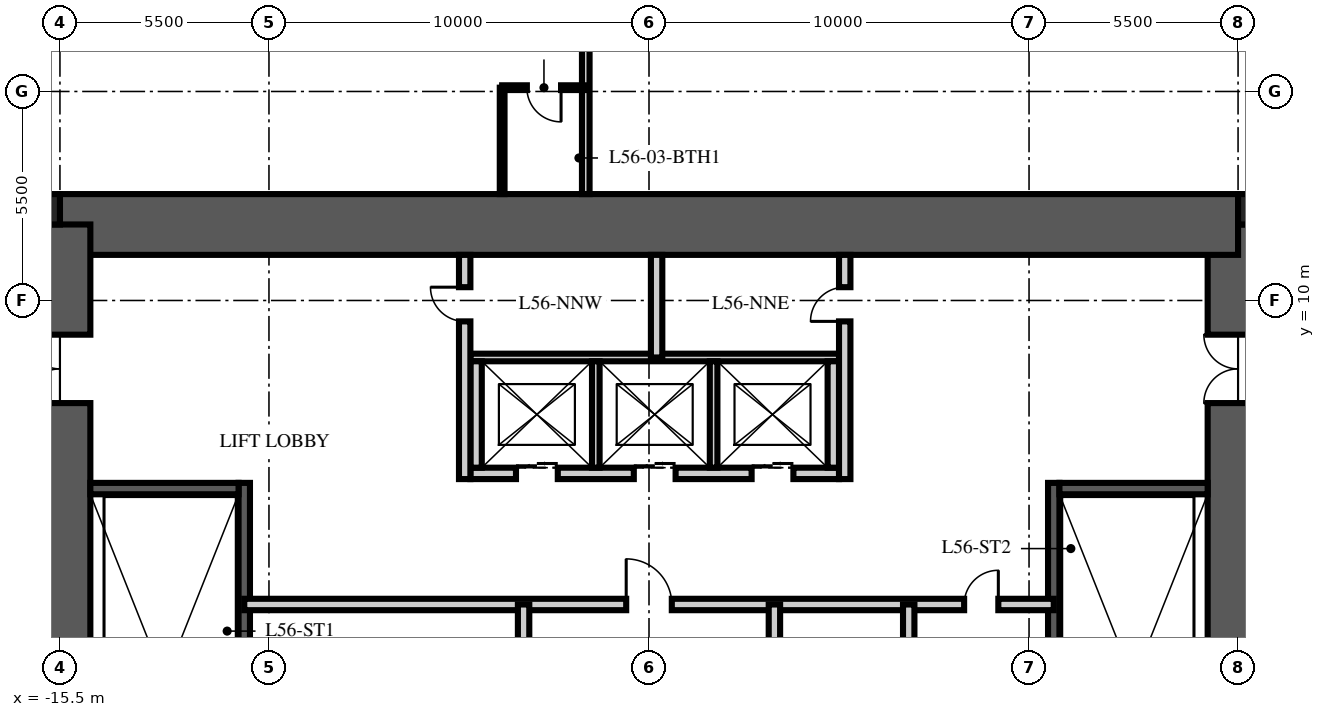
"""IFC4 building model, lengths in metres.
Left out: names, types, materials, properties, quantities, classifications, styles, units other than length and angle.
Written with IfcOpenShell. Run it as: python <this file> out.ifc"""

import sys

from ifc_helpers import new_model, si_unit, direction, frame, frame_2d, origin, origin_2d, place, context, subcontext, project, spatial, rectangle, extrude, element, fill, save


model = new_model("IFC4")
c1 = context("Model", 3, precision=1e-05, world=origin(), true_north=direction((0.0, 1.0)))
c2 = subcontext(c1, "Body", "Model", "MODEL_VIEW")
j1 = project(units=[si_unit("LENGTHUNIT", "METRE"), si_unit("PLANEANGLEUNIT", "RADIAN")], contexts=[c1])
p1 = place(None, origin())
s1 = spatial("IfcSite", under=j1, at=p1, CompositionType="ELEMENT")
p2 = place(p1, origin())
s2 = spatial("IfcBuilding", under=s1, at=p2, CompositionType="ELEMENT")
p3 = place(p2, frame((0.0, 0.0, 225.75)))
s3 = spatial("IfcBuildingStorey", under=s2, at=p3, CompositionType="ELEMENT", Elevation=225.75)
p4 = place(p3, frame((15.5, -12.0, -0.25), z_axis=(0.0, 0.0, 1.0), x_axis=(0.0, 1.0, 0.0)))
e1 = element("IfcWall", 1, at=p4, inside=s3, PredefinedType="SHEAR", context=c2, shape_type="SweptSolid", body=[
    extrude(rectangle(XDim=24.0, YDim=1.6, at=frame_2d((12.0, 0.0))), origin(), (0.0, 0.0, 1.0), 3.75),
])
p5 = place(p4, frame((3.2, 0.0, 0.25)))
e2 = element("IfcOpeningElement", 2, at=p5, cuts=e1, PredefinedType="OPENING", context=c2, shape_type="SweptSolid", body=[
    extrude(rectangle(XDim=1.2, YDim=2.1, at=frame_2d((0.6, 1.05))), frame((0.0, 0.81, 0.0), z_axis=(0.0, -1.0, 0.0), x_axis=(1.0, 0.0, 0.0)), (0.0, 0.0, 1.0), 1.62),
])
p6 = place(p4, frame((19.3, 0.0, 0.25)))
e3 = element("IfcOpeningElement", 3, at=p6, cuts=e1, PredefinedType="OPENING", context=c2, shape_type="SweptSolid", body=[
    extrude(rectangle(XDim=1.8, YDim=2.1, at=frame_2d((0.9, 1.05))), frame((0.0, 0.81, 0.0), z_axis=(0.0, -1.0, 0.0), x_axis=(1.0, 0.0, 0.0)), (0.0, 0.0, 1.0), 1.62),
])
p7 = place(p3, frame((-15.5, 12.0, -0.25), z_axis=(0.0, 0.0, 1.0), x_axis=(1.0, 0.0, 0.0)))
e4 = element("IfcWall", 4, at=p7, inside=s3, PredefinedType="SHEAR", context=c2, shape_type="SweptSolid", body=[
    extrude(rectangle(XDim=31.0, YDim=1.6, at=frame_2d((15.5, 0.0))), origin(), (0.0, 0.0, 1.0), 3.75),
])
p8 = place(p3, frame((-15.5, -12.0, -0.25), z_axis=(0.0, 0.0, 1.0), x_axis=(0.0, 1.0, 0.0)))
e5 = element("IfcWall", 5, at=p8, inside=s3, PredefinedType="SHEAR", context=c2, shape_type="SweptSolid", body=[
    extrude(rectangle(XDim=24.0, YDim=1.6, at=frame_2d((12.0, 0.0))), origin(), (0.0, 0.0, 1.0), 3.75),
])
p9 = place(p8, frame((3.2, 0.0, 0.25)))
e6 = element("IfcOpeningElement", 6, at=p9, cuts=e5, PredefinedType="OPENING", context=c2, shape_type="SweptSolid", body=[
    extrude(rectangle(XDim=1.2, YDim=2.1, at=frame_2d((0.6, 1.05))), frame((0.0, 0.81, 0.0), z_axis=(0.0, -1.0, 0.0), x_axis=(1.0, 0.0, 0.0)), (0.0, 0.0, 1.0), 1.62),
])
p10 = place(p8, frame((19.3, 0.0, 0.25)))
e7 = element("IfcOpeningElement", 7, at=p10, cuts=e5, PredefinedType="OPENING", context=c2, shape_type="SweptSolid", body=[
    extrude(rectangle(XDim=1.8, YDim=2.1, at=frame_2d((0.9, 1.05))), frame((0.0, 0.81, 0.0), z_axis=(0.0, -1.0, 0.0), x_axis=(1.0, 0.0, 0.0)), (0.0, 0.0, 1.0), 1.62),
])
for number, where, z_axis, x_axis in (
    (8, (15.9, 12.4, -0.25), (0.0, 0.0, 1.0), (1.0, 0.0, 0.0)),
    (9, (-15.9, 12.4, -0.25), (0.0, 0.0, 1.0), (1.0, 0.0, 0.0)),
):
    element("IfcColumn", number, at=place(p3, frame(where, z_axis=z_axis, x_axis=x_axis)), inside=s3, PredefinedType="COLUMN", context=c2, shape_type="SweptSolid", body=[
        extrude(rectangle(XDim=0.8, YDim=0.8, at=origin_2d()), origin(), (0.0, 0.0, 1.0), 3.75),
    ])
p11 = place(p3, frame((-10.65, -4.9, 0.0), z_axis=(0.0, 0.0, 1.0), x_axis=(0.0, 1.0, 0.0)))
e10 = element("IfcWall", 10, at=p11, inside=s3, PredefinedType="SOLIDWALL", context=c2, shape_type="SweptSolid", body=[
    extrude(rectangle(XDim=10.1, YDim=0.3, at=frame_2d((5.05, 0.0))), origin(), (0.0, 0.0, 1.0), 3.5),
])
p12 = place(p3, frame((-14.7, 5.05, 0.0), z_axis=(0.0, 0.0, 1.0), x_axis=(1.0, 0.0, 0.0)))
e11 = element("IfcWall", 11, at=p12, inside=s3, PredefinedType="SOLIDWALL", context=c2, shape_type="SweptSolid", body=[
    extrude(rectangle(XDim=3.9, YDim=0.3, at=frame_2d((1.95, 0.0))), origin(), (0.0, 0.0, 1.0), 3.5),
])
p13 = place(p3, frame((10.65, -4.9, 0.0), z_axis=(0.0, 0.0, 1.0), x_axis=(0.0, 1.0, 0.0)))
e12 = element("IfcWall", 12, at=p13, inside=s3, PredefinedType="SOLIDWALL", context=c2, shape_type="SweptSolid", body=[
    extrude(rectangle(XDim=10.1, YDim=0.3, at=frame_2d((5.05, 0.0))), origin(), (0.0, 0.0, 1.0), 3.5),
])
p14 = place(p3, frame((14.7, 5.05, 0.0), z_axis=(0.0, 0.0, 1.0), x_axis=(-1.0, 0.0, 0.0)))
e13 = element("IfcWall", 13, at=p14, inside=s3, PredefinedType="SOLIDWALL", context=c2, shape_type="SweptSolid", body=[
    extrude(rectangle(XDim=3.9, YDim=0.3, at=frame_2d((1.95, 0.0))), origin(), (0.0, 0.0, 1.0), 3.5),
])
p15 = place(p3, frame((-4.7, 5.45, 0.0), z_axis=(0.0, 0.0, 1.0), x_axis=(1.0, 0.0, 0.0)))
e14 = element("IfcWall", 14, at=p15, inside=s3, PredefinedType="PARTITIONING", context=c2, shape_type="SweptSolid", body=[
    extrude(rectangle(XDim=9.7, YDim=0.3, at=frame_2d((4.85, 0.0))), origin(), (0.0, 0.0, 1.0), 3.5),
])
p16 = place(p15, frame((1.2, 0.0, 0.0)))
e15 = element("IfcOpeningElement", 15, at=p16, cuts=e14, PredefinedType="OPENING", context=c2, shape_type="SweptSolid", body=[
    extrude(rectangle(XDim=1.1, YDim=2.1, at=frame_2d((0.55, 1.05))), frame((0.0, 0.16, 0.0), z_axis=(0.0, -1.0, 0.0), x_axis=(1.0, 0.0, 0.0)), (0.0, 0.0, 1.0), 0.32),
])
p17 = place(p15, frame((4.3, 0.0, 0.0)))
e16 = element("IfcOpeningElement", 16, at=p17, cuts=e14, PredefinedType="OPENING", context=c2, shape_type="SweptSolid", body=[
    extrude(rectangle(XDim=1.1, YDim=2.1, at=frame_2d((0.55, 1.05))), frame((0.0, 0.16, 0.0), z_axis=(0.0, -1.0, 0.0), x_axis=(1.0, 0.0, 0.0)), (0.0, 0.0, 1.0), 0.32),
])
p18 = place(p15, frame((7.4, 0.0, 0.0)))
e17 = element("IfcOpeningElement", 17, at=p18, cuts=e14, PredefinedType="OPENING", context=c2, shape_type="SweptSolid", body=[
    extrude(rectangle(XDim=1.1, YDim=2.1, at=frame_2d((0.55, 1.05))), frame((0.0, 0.16, 0.0), z_axis=(0.0, -1.0, 0.0), x_axis=(1.0, 0.0, 0.0)), (0.0, 0.0, 1.0), 0.32),
])
p19 = place(p3, frame((-4.7, 8.5, 0.0), z_axis=(0.0, 0.0, 1.0), x_axis=(1.0, 0.0, 0.0)))
e18 = element("IfcWall", 18, at=p19, inside=s3, PredefinedType="PARTITIONING", context=c2, shape_type="SweptSolid", body=[
    extrude(rectangle(XDim=9.7, YDim=0.2, at=frame_2d((4.85, 0.0))), origin(), (0.0, 0.0, 1.0), 3.5),
])
for number, where, z_axis, x_axis in (
    (19, (-4.55, 5.6, 0.0), (0.0, 0.0, 1.0), (0.0, 1.0, 0.0)),
    (20, (4.85, 5.6, 0.0), (0.0, 0.0, 1.0), (0.0, 1.0, 0.0)),
):
    element("IfcWall", number, at=place(p3, frame(where, z_axis=z_axis, x_axis=x_axis)), inside=s3, PredefinedType="PARTITIONING", context=c2, shape_type="SweptSolid", body=[
        extrude(rectangle(XDim=2.8, YDim=0.3, at=frame_2d((1.4, 0.0))), origin(), (0.0, 0.0, 1.0), 3.5),
    ])
for number, where, z_axis, x_axis in (
    (21, (-1.4, 5.6, 0.0), (0.0, 0.0, 1.0), (0.0, 1.0, 0.0)),
    (22, (1.7, 5.6, 0.0), (0.0, 0.0, 1.0), (0.0, 1.0, 0.0)),
):
    element("IfcWall", number, at=place(p3, frame(where, z_axis=z_axis, x_axis=x_axis)), inside=s3, PredefinedType="PARTITIONING", context=c2, shape_type="SweptSolid", body=[
        extrude(rectangle(XDim=2.8, YDim=0.2, at=frame_2d((1.4, 0.0))), origin(), (0.0, 0.0, 1.0), 3.5),
    ])
p20 = place(p3, frame((-10.65, 2.0, 0.0), z_axis=(0.0, 0.0, 1.0), x_axis=(1.0, 0.0, 0.0)))
e23 = element("IfcWall", 23, at=p20, inside=s3, PredefinedType="PARTITIONING", context=c2, shape_type="SweptSolid", body=[
    extrude(rectangle(XDim=21.3, YDim=0.3, at=frame_2d((10.65, 0.0))), origin(), (0.0, 0.0, 1.0), 3.5),
])
p21 = place(p20, frame((10.05, 0.0, 0.0)))
e24 = element("IfcOpeningElement", 24, at=p21, cuts=e23, PredefinedType="OPENING", context=c2, shape_type="SweptSolid", body=[
    extrude(rectangle(XDim=1.2, YDim=2.1, at=frame_2d((0.6, 1.05))), frame((0.0, 0.16, 0.0), z_axis=(0.0, -1.0, 0.0), x_axis=(1.0, 0.0, 0.0)), (0.0, 0.0, 1.0), 0.32),
])
p22 = place(p20, frame((18.942, 0.0, 0.0)))
e25 = element("IfcOpeningElement", 25, at=p22, cuts=e23, PredefinedType="OPENING", context=c2, shape_type="SweptSolid", body=[
    extrude(rectangle(XDim=0.9, YDim=2.1, at=frame_2d((0.45, 1.05))), frame((0.0, 0.16, 0.0), z_axis=(0.0, -1.0, 0.0), x_axis=(1.0, 0.0, 0.0)), (0.0, 0.0, 1.0), 0.32),
])
p23 = place(p3, frame((-3.3, -6.65, 0.0), z_axis=(0.0, 0.0, 1.0), x_axis=(0.0, 1.0, 0.0)))
e26 = element("IfcWall", 26, at=p23, inside=s3, PredefinedType="PARTITIONING", context=c2, shape_type="SweptSolid", body=[
    extrude(rectangle(XDim=8.65, YDim=0.3, at=frame_2d((4.325, 0.0))), origin(), (0.0, 0.0, 1.0), 3.5),
])
p24 = place(p23, frame((1.75, 0.0, 0.0)))
e27 = element("IfcOpeningElement", 27, at=p24, cuts=e26, PredefinedType="OPENING", context=c2, shape_type="SweptSolid", body=[
    extrude(rectangle(XDim=0.9, YDim=2.1, at=frame_2d((0.45, 1.05))), frame((0.0, 0.16, 0.0), z_axis=(0.0, -1.0, 0.0), x_axis=(1.0, 0.0, 0.0)), (0.0, 0.0, 1.0), 0.32),
])
p25 = place(p23, frame((6.075, 0.0, 0.0)))
e28 = element("IfcOpeningElement", 28, at=p25, cuts=e26, PredefinedType="OPENING", context=c2, shape_type="SweptSolid", body=[
    extrude(rectangle(XDim=0.9, YDim=2.1, at=frame_2d((0.45, 1.05))), frame((0.0, 0.16, 0.0), z_axis=(0.0, -1.0, 0.0), x_axis=(1.0, 0.0, 0.0)), (0.0, 0.0, 1.0), 0.32),
])
p26 = place(p3, frame((3.3, -6.65, 0.0), z_axis=(0.0, 0.0, 1.0), x_axis=(0.0, 1.0, 0.0)))
e29 = element("IfcWall", 29, at=p26, inside=s3, PredefinedType="PARTITIONING", context=c2, shape_type="SweptSolid", body=[
    extrude(rectangle(XDim=8.65, YDim=0.3, at=frame_2d((4.325, 0.0))), origin(), (0.0, 0.0, 1.0), 3.5),
])
p27 = place(p26, frame((3.875, 0.0, 0.0)))
e30 = element("IfcOpeningElement", 30, at=p27, cuts=e29, PredefinedType="OPENING", context=c2, shape_type="SweptSolid", body=[
    extrude(rectangle(XDim=0.9, YDim=2.1, at=frame_2d((0.45, 1.05))), frame((0.0, 0.16, 0.0), z_axis=(0.0, -1.0, 0.0), x_axis=(1.0, 0.0, 0.0)), (0.0, 0.0, 1.0), 0.32),
])
p28 = place(p3, frame((6.834, -6.65, 0.0), z_axis=(0.0, 0.0, 1.0), x_axis=(0.0, 1.0, 0.0)))
e31 = element("IfcWall", 31, at=p28, inside=s3, PredefinedType="PARTITIONING", context=c2, shape_type="SweptSolid", body=[
    extrude(rectangle(XDim=8.65, YDim=0.3, at=frame_2d((4.325, 0.0))), origin(), (0.0, 0.0, 1.0), 3.5),
])
p29 = place(p3, frame((-4.85, 5.3, 0.0), z_axis=(0.0, 0.0, 1.0), x_axis=(0.0, 1.0, 0.0)))
e32 = element("IfcWall", 32, at=p29, inside=s3, PredefinedType="PARTITIONING", context=c2, shape_type="SweptSolid", body=[
    extrude(rectangle(XDim=5.9, YDim=0.3, at=frame_2d((2.95, 0.0))), origin(), (0.0, 0.0, 1.0), 3.5),
])
p30 = place(p29, frame((4.15, 0.0, 0.0)))
e33 = element("IfcOpeningElement", 33, at=p30, cuts=e32, PredefinedType="OPENING", context=c2, shape_type="SweptSolid", body=[
    extrude(rectangle(XDim=0.9, YDim=2.1, at=frame_2d((0.45, 1.05))), frame((0.0, 0.16, 0.0), z_axis=(0.0, -1.0, 0.0), x_axis=(1.0, 0.0, 0.0)), (0.0, 0.0, 1.0), 0.32),
])
p31 = place(p3, frame((5.15, 5.3, 0.0), z_axis=(0.0, 0.0, 1.0), x_axis=(0.0, 1.0, 0.0)))
e34 = element("IfcWall", 34, at=p31, inside=s3, PredefinedType="PARTITIONING", context=c2, shape_type="SweptSolid", body=[
    extrude(rectangle(XDim=5.9, YDim=0.3, at=frame_2d((2.95, 0.0))), origin(), (0.0, 0.0, 1.0), 3.5),
])
p32 = place(p31, frame((4.15, 0.0, 0.0)))
e35 = element("IfcOpeningElement", 35, at=p32, cuts=e34, PredefinedType="OPENING", context=c2, shape_type="SweptSolid", body=[
    extrude(rectangle(XDim=0.9, YDim=2.1, at=frame_2d((0.45, 1.05))), frame((0.0, 0.16, 0.0), z_axis=(0.0, -1.0, 0.0), x_axis=(1.0, 0.0, 0.0)), (0.0, 0.0, 1.0), 0.32),
])
p33 = place(p3, frame((0.2, 8.5, 0.0), z_axis=(0.0, 0.0, 1.0), x_axis=(0.0, 1.0, 0.0)))
e36 = element("IfcWall", 36, at=p33, inside=s3, PredefinedType="PARTITIONING", context=c2, shape_type="SweptSolid", body=[
    extrude(rectangle(XDim=2.7, YDim=0.3, at=frame_2d((1.35, 0.0))), origin(), (0.0, 0.0, 1.0), 3.5),
])
p34 = place(p3, frame((-1.664, 12.8, 0.0), z_axis=(0.0, 0.0, 1.0), x_axis=(0.0, 1.0, 0.0)))
e37 = element("IfcWall", 37, at=p34, inside=s3, PredefinedType="PARTITIONING", context=c2, shape_type="SweptSolid", body=[
    extrude(rectangle(XDim=13.4, YDim=0.2, at=frame_2d((6.7, 0.0))), origin(), (0.0, 0.0, 1.0), 2.91),
])
p35 = place(p3, frame((-1.664, 15.6, 0.0), z_axis=(0.0, 0.0, 1.0), x_axis=(-1.0, 0.0, 0.0)))
e38 = element("IfcWall", 38, at=p35, inside=s3, PredefinedType="PARTITIONING", context=c2, shape_type="SweptSolid", body=[
    extrude(rectangle(XDim=2.2, YDim=0.125, at=frame_2d((1.1, 0.0))), origin(), (0.0, 0.0, 1.0), 3.5),
])
p36 = place(p35, frame((0.65, 0.0, 0.0)))
e39 = element("IfcOpeningElement", 39, at=p36, cuts=e38, PredefinedType="OPENING", context=c2, shape_type="SweptSolid", body=[
    extrude(rectangle(XDim=0.9, YDim=2.1, at=frame_2d((0.45, 1.05))), frame((0.0, 0.073, 0.0), z_axis=(0.0, -1.0, 0.0), x_axis=(1.0, 0.0, 0.0)), (0.0, 0.0, 1.0), 0.145),
])
p37 = place(p3, frame((-3.864, 12.8, 0.0), z_axis=(0.0, 0.0, 1.0), x_axis=(0.0, 1.0, 0.0)))
e40 = element("IfcWall", 40, at=p37, inside=s3, PredefinedType="PARTITIONING", context=c2, shape_type="SweptSolid", body=[
    extrude(rectangle(XDim=2.8, YDim=0.125, at=frame_2d((1.4, 0.0))), origin(), (0.0, 0.0, 1.0), 3.5),
])
p38 = place(p10, origin())
e41 = element("IfcDoor", 41, at=p38, inside=s3, OperationType="DOUBLE_DOOR_SINGLE_SWING", PredefinedType="DOOR", context=c2, shape_type="SweptSolid", body=[
    extrude(rectangle(XDim=1.8, YDim=2.1, at=frame_2d((0.9, 1.05))), frame((0.0, 0.025, 0.0), z_axis=(0.0, -1.0, 0.0), x_axis=(1.0, 0.0, 0.0)), (0.0, 0.0, 1.0), 0.05),
])
fill(e7, e41)
p39 = place(p6, origin())
e42 = element("IfcDoor", 42, at=p39, inside=s3, OperationType="DOUBLE_DOOR_SINGLE_SWING", PredefinedType="DOOR", context=c2, shape_type="SweptSolid", body=[
    extrude(rectangle(XDim=1.8, YDim=2.1, at=frame_2d((0.9, 1.05))), frame((0.0, 0.025, 0.0), z_axis=(0.0, -1.0, 0.0), x_axis=(1.0, 0.0, 0.0)), (0.0, 0.0, 1.0), 0.05),
])
fill(e3, e42)
p40 = place(p16, origin())
e43 = element("IfcDoor", 43, at=p40, inside=s3, OperationType="DOUBLE_DOOR_SLIDING", PredefinedType="DOOR", context=c2, shape_type="SweptSolid", body=[
    extrude(rectangle(XDim=1.1, YDim=2.1, at=frame_2d((0.55, 1.05))), frame((0.0, 0.025, 0.0), z_axis=(0.0, -1.0, 0.0), x_axis=(1.0, 0.0, 0.0)), (0.0, 0.0, 1.0), 0.05),
])
fill(e15, e43)
p41 = place(p17, origin())
e44 = element("IfcDoor", 44, at=p41, inside=s3, OperationType="DOUBLE_DOOR_SLIDING", PredefinedType="DOOR", context=c2, shape_type="SweptSolid", body=[
    extrude(rectangle(XDim=1.1, YDim=2.1, at=frame_2d((0.55, 1.05))), frame((0.0, 0.025, 0.0), z_axis=(0.0, -1.0, 0.0), x_axis=(1.0, 0.0, 0.0)), (0.0, 0.0, 1.0), 0.05),
])
fill(e16, e44)
p42 = place(p18, origin())
e45 = element("IfcDoor", 45, at=p42, inside=s3, OperationType="DOUBLE_DOOR_SLIDING", PredefinedType="DOOR", context=c2, shape_type="SweptSolid", body=[
    extrude(rectangle(XDim=1.1, YDim=2.1, at=frame_2d((0.55, 1.05))), frame((0.0, 0.025, 0.0), z_axis=(0.0, -1.0, 0.0), x_axis=(1.0, 0.0, 0.0)), (0.0, 0.0, 1.0), 0.05),
])
fill(e17, e45)
p43 = place(p21, origin())
e46 = element("IfcDoor", 46, at=p43, inside=s3, OperationType="SINGLE_SWING_LEFT", PredefinedType="DOOR", context=c2, shape_type="SweptSolid", body=[
    extrude(rectangle(XDim=1.2, YDim=2.1, at=frame_2d((0.6, 1.05))), frame((0.0, 0.025, 0.0), z_axis=(0.0, -1.0, 0.0), x_axis=(1.0, 0.0, 0.0)), (0.0, 0.0, 1.0), 0.05),
])
fill(e24, e46)
p44 = place(p22, origin())
e47 = element("IfcDoor", 47, at=p44, inside=s3, OperationType="SINGLE_SWING_RIGHT", PredefinedType="DOOR", context=c2, shape_type="SweptSolid", body=[
    extrude(rectangle(XDim=0.9, YDim=2.1, at=frame_2d((0.45, 1.05))), frame((0.0, 0.025, 0.0), z_axis=(0.0, -1.0, 0.0), x_axis=(1.0, 0.0, 0.0)), (0.0, 0.0, 1.0), 0.05),
])
fill(e25, e47)
p45 = place(p30, origin())
e48 = element("IfcDoor", 48, at=p45, inside=s3, OperationType="SINGLE_SWING_RIGHT", PredefinedType="DOOR", context=c2, shape_type="SweptSolid", body=[
    extrude(rectangle(XDim=0.9, YDim=2.1, at=frame_2d((0.45, 1.05))), frame((0.0, 0.025, 0.0), z_axis=(0.0, -1.0, 0.0), x_axis=(1.0, 0.0, 0.0)), (0.0, 0.0, 1.0), 0.05),
])
fill(e33, e48)
p46 = place(p32, origin())
e49 = element("IfcDoor", 49, at=p46, inside=s3, OperationType="SINGLE_SWING_LEFT", PredefinedType="DOOR", context=c2, shape_type="SweptSolid", body=[
    extrude(rectangle(XDim=0.9, YDim=2.1, at=frame_2d((0.45, 1.05))), frame((0.0, 0.025, 0.0), z_axis=(0.0, -1.0, 0.0), x_axis=(1.0, 0.0, 0.0)), (0.0, 0.0, 1.0), 0.05),
])
fill(e35, e49)
p47 = place(p36, origin())
e50 = element("IfcDoor", 50, at=p47, inside=s3, OperationType="SINGLE_SWING_LEFT", PredefinedType="DOOR", context=c2, shape_type="SweptSolid", body=[
    extrude(rectangle(XDim=0.9, YDim=2.1, at=frame_2d((0.45, 1.05))), frame((0.0, 0.025, 0.0), z_axis=(0.0, -1.0, 0.0), x_axis=(1.0, 0.0, 0.0)), (0.0, 0.0, 1.0), 0.05),
])
fill(e39, e50)
save(model, sys.argv[1])
